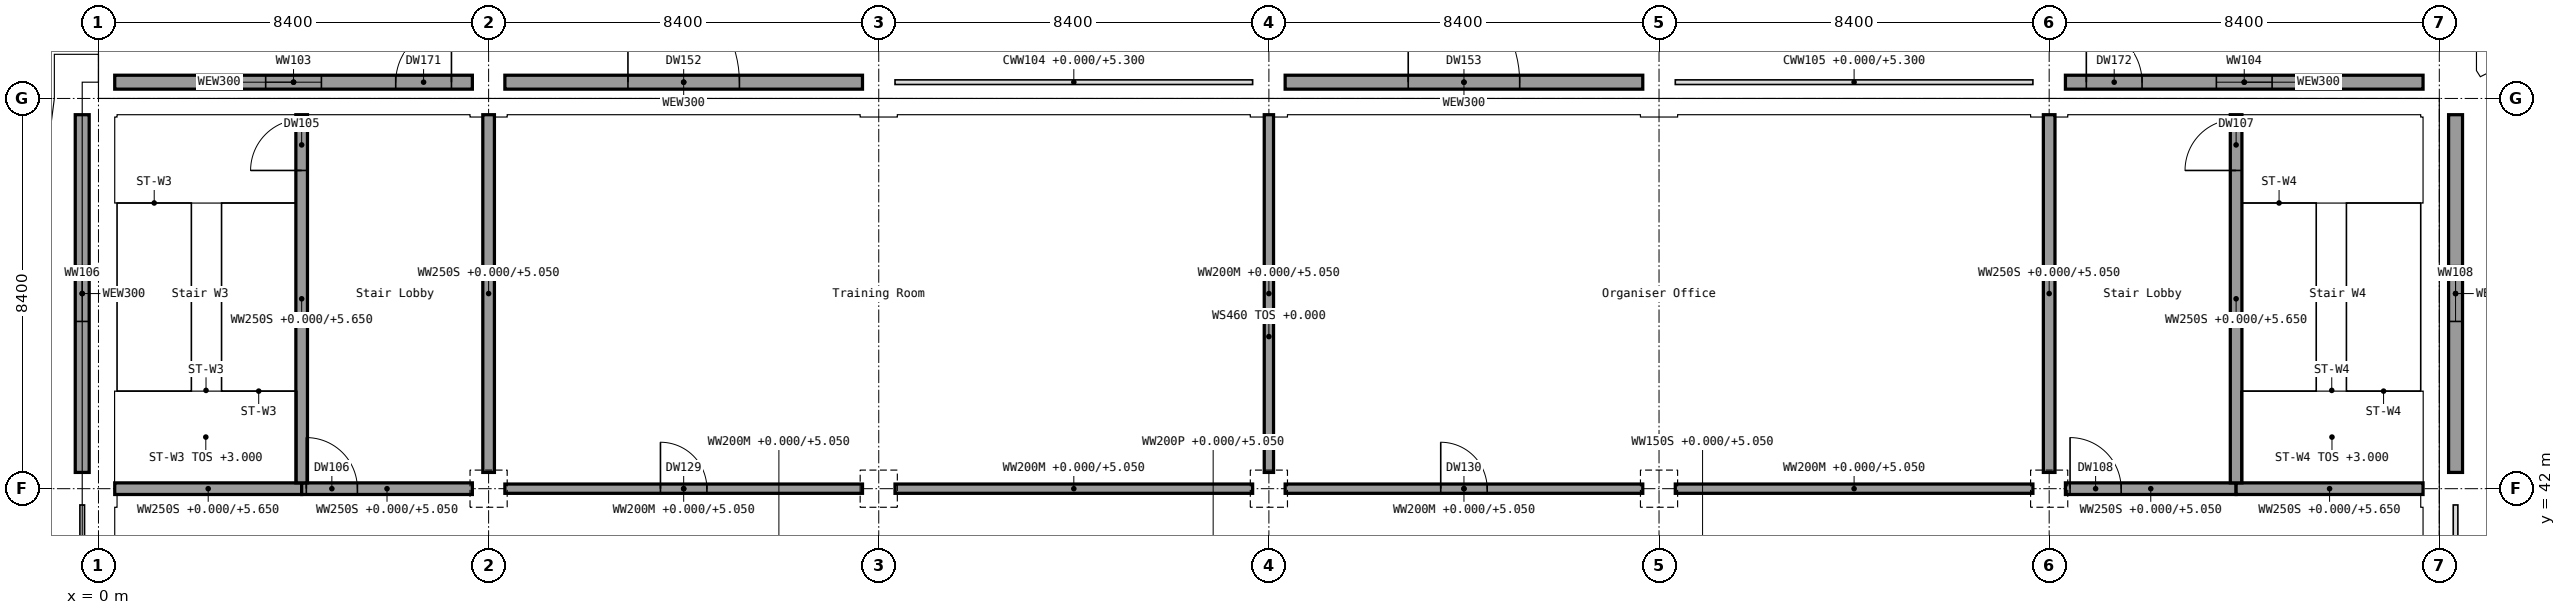
"""IFC4 building model, lengths in metres.
Left out: names, types, materials, properties, quantities, classifications, styles, units other than length and angle.
Written with IfcOpenShell. Run it as: python <this file> out.ifc"""

import sys

from ifc_helpers import new_model, si_unit, direction, frame, frame_2d, origin, origin_2d, place, context, subcontext, project, spatial, rectangle, extrude, element, fill, save


model = new_model("IFC4")
c1 = context("Model", 3, precision=1e-05, world=origin(), true_north=direction((0.0, 1.0)))
c2 = subcontext(c1, "Body", "Model", "MODEL_VIEW")
j1 = project(units=[si_unit("LENGTHUNIT", "METRE"), si_unit("PLANEANGLEUNIT", "RADIAN")], contexts=[c1])
p1 = place(None, origin())
s1 = spatial("IfcSite", under=j1, at=p1, CompositionType="ELEMENT")
p2 = place(p1, origin())
s2 = spatial("IfcBuilding", under=s1, at=p2, CompositionType="ELEMENT")
p3 = place(p2, origin())
s3 = spatial("IfcBuildingStorey", under=s2, at=p3, CompositionType="ELEMENT", Elevation=0.0)
for number, where, z_axis, x_axis in (
    (1, (0.0, 42.0, 0.0), (0.0, 0.0, 1.0), (1.0, 0.0, 0.0)),
    (2, (0.0, 50.4, 0.0), (0.0, 0.0, 1.0), (1.0, 0.0, 0.0)),
    (3, (8.4, 42.0, 0.0), (0.0, 0.0, 1.0), (1.0, 0.0, 0.0)),
    (4, (8.4, 50.4, 0.0), (0.0, 0.0, 1.0), (1.0, 0.0, 0.0)),
    (5, (16.8, 42.0, 0.0), (0.0, 0.0, 1.0), (1.0, 0.0, 0.0)),
    (6, (16.8, 50.4, 0.0), (0.0, 0.0, 1.0), (1.0, 0.0, 0.0)),
    (7, (25.2, 42.0, 0.0), (0.0, 0.0, 1.0), (1.0, 0.0, 0.0)),
    (8, (25.2, 50.4, 0.0), (0.0, 0.0, 1.0), (1.0, 0.0, 0.0)),
    (9, (33.6, 42.0, 0.0), (0.0, 0.0, 1.0), (1.0, 0.0, 0.0)),
    (10, (33.6, 50.4, 0.0), (0.0, 0.0, 1.0), (1.0, 0.0, 0.0)),
    (11, (42.0, 42.0, 0.0), (0.0, 0.0, 1.0), (1.0, 0.0, 0.0)),
    (12, (42.0, 50.4, 0.0), (0.0, 0.0, 1.0), (1.0, 0.0, 0.0)),
    (13, (50.4, 42.0, 0.0), (0.0, 0.0, 1.0), (1.0, 0.0, 0.0)),
    (14, (50.4, 50.4, 0.0), (0.0, 0.0, 1.0), (1.0, 0.0, 0.0)),
):
    element("IfcColumn", number, at=place(p3, frame(where, z_axis=z_axis, x_axis=x_axis)), inside=s3, PredefinedType="COLUMN", context=c2, shape_type="SweptSolid", body=[
        extrude(rectangle(XDim=0.7, YDim=0.7, at=origin_2d()), origin(), (0.0, 0.0, 1.0), 6.0),
    ])
p4 = place(p3, frame((0.35, 50.75, 0.0), z_axis=(0.0, 0.0, 1.0), x_axis=(1.0, 0.0, 0.0)))
e15 = element("IfcWall", 15, at=p4, inside=s3, PredefinedType="SOLIDWALL", context=c2, shape_type="SweptSolid", body=[
    extrude(rectangle(XDim=7.7, YDim=0.3, at=frame_2d((3.85, 0.0))), origin(), (0.0, 0.0, 1.0), 5.3),
])
p5 = place(p4, frame((3.25, 0.0, 1.0)))
e16 = element("IfcOpeningElement", 16, at=p5, cuts=e15, PredefinedType="OPENING", context=c2, shape_type="SweptSolid", body=[
    extrude(rectangle(XDim=1.2, YDim=1.5, at=frame_2d((0.6, 0.75))), frame((0.0, 0.15, 0.0), z_axis=(0.0, -1.0, 0.0), x_axis=(1.0, 0.0, 0.0)), (0.0, 0.0, 1.0), 0.3),
])
p6 = place(p4, frame((6.05, 0.0, 0.0)))
e17 = element("IfcOpeningElement", 17, at=p6, cuts=e15, PredefinedType="OPENING", context=c2, shape_type="SweptSolid", body=[
    extrude(rectangle(XDim=1.2, YDim=2.1, at=frame_2d((0.6, 1.05))), frame((0.0, 0.15, 0.0), z_axis=(0.0, -1.0, 0.0), x_axis=(1.0, 0.0, 0.0)), (0.0, 0.0, 1.0), 0.3),
])
p7 = place(p3, frame((8.75, 50.75, 0.0), z_axis=(0.0, 0.0, 1.0), x_axis=(1.0, 0.0, 0.0)))
e18 = element("IfcWall", 18, at=p7, inside=s3, PredefinedType="SOLIDWALL", context=c2, shape_type="SweptSolid", body=[
    extrude(rectangle(XDim=7.7, YDim=0.3, at=frame_2d((3.85, 0.0))), origin(), (0.0, 0.0, 1.0), 5.3),
])
p8 = place(p7, frame((2.65, 0.0, 0.0)))
e19 = element("IfcOpeningElement", 19, at=p8, cuts=e18, PredefinedType="OPENING", context=c2, shape_type="SweptSolid", body=[
    extrude(rectangle(XDim=2.4, YDim=2.4, at=frame_2d((1.2, 1.2))), frame((0.0, 0.15, 0.0), z_axis=(0.0, -1.0, 0.0), x_axis=(1.0, 0.0, 0.0)), (0.0, 0.0, 1.0), 0.3),
])
p9 = place(p3, frame((25.55, 50.75, 0.0), z_axis=(0.0, 0.0, 1.0), x_axis=(1.0, 0.0, 0.0)))
e20 = element("IfcWall", 20, at=p9, inside=s3, PredefinedType="SOLIDWALL", context=c2, shape_type="SweptSolid", body=[
    extrude(rectangle(XDim=7.7, YDim=0.3, at=frame_2d((3.85, 0.0))), origin(), (0.0, 0.0, 1.0), 5.3),
])
p10 = place(p9, frame((2.65, 0.0, 0.0)))
e21 = element("IfcOpeningElement", 21, at=p10, cuts=e20, PredefinedType="OPENING", context=c2, shape_type="SweptSolid", body=[
    extrude(rectangle(XDim=2.4, YDim=2.4, at=frame_2d((1.2, 1.2))), frame((0.0, 0.15, 0.0), z_axis=(0.0, -1.0, 0.0), x_axis=(1.0, 0.0, 0.0)), (0.0, 0.0, 1.0), 0.3),
])
p11 = place(p3, frame((42.35, 50.75, 0.0), z_axis=(0.0, 0.0, 1.0), x_axis=(1.0, 0.0, 0.0)))
e22 = element("IfcWall", 22, at=p11, inside=s3, PredefinedType="SOLIDWALL", context=c2, shape_type="SweptSolid", body=[
    extrude(rectangle(XDim=7.7, YDim=0.3, at=frame_2d((3.85, 0.0))), origin(), (0.0, 0.0, 1.0), 5.3),
])
p12 = place(p11, frame((3.25, 0.0, 1.0)))
e23 = element("IfcOpeningElement", 23, at=p12, cuts=e22, PredefinedType="OPENING", context=c2, shape_type="SweptSolid", body=[
    extrude(rectangle(XDim=1.2, YDim=1.5, at=frame_2d((0.6, 0.75))), frame((0.0, 0.15, 0.0), z_axis=(0.0, -1.0, 0.0), x_axis=(1.0, 0.0, 0.0)), (0.0, 0.0, 1.0), 0.3),
])
p13 = place(p11, frame((0.45, 0.0, 0.0)))
e24 = element("IfcOpeningElement", 24, at=p13, cuts=e22, PredefinedType="OPENING", context=c2, shape_type="SweptSolid", body=[
    extrude(rectangle(XDim=1.2, YDim=2.1, at=frame_2d((0.6, 1.05))), frame((0.0, 0.15, 0.0), z_axis=(0.0, -1.0, 0.0), x_axis=(1.0, 0.0, 0.0)), (0.0, 0.0, 1.0), 0.3),
])
p14 = place(p3, frame((-0.35, 42.35, 0.0), z_axis=(0.0, 0.0, 1.0), x_axis=(0.0, 1.0, 0.0)))
e25 = element("IfcWall", 25, at=p14, inside=s3, PredefinedType="SOLIDWALL", context=c2, shape_type="SweptSolid", body=[
    extrude(rectangle(XDim=7.7, YDim=0.3, at=frame_2d((3.85, 0.0))), origin(), (0.0, 0.0, 1.0), 5.3),
])
p15 = place(p14, frame((3.25, 0.0, 1.0)))
e26 = element("IfcOpeningElement", 26, at=p15, cuts=e25, PredefinedType="OPENING", context=c2, shape_type="SweptSolid", body=[
    extrude(rectangle(XDim=1.2, YDim=1.5, at=frame_2d((0.6, 0.75))), frame((0.0, 0.15, 0.0), z_axis=(0.0, -1.0, 0.0), x_axis=(1.0, 0.0, 0.0)), (0.0, 0.0, 1.0), 0.3),
])
p16 = place(p3, frame((50.75, 42.35, 0.0), z_axis=(0.0, 0.0, 1.0), x_axis=(0.0, 1.0, 0.0)))
e27 = element("IfcWall", 27, at=p16, inside=s3, PredefinedType="SOLIDWALL", context=c2, shape_type="SweptSolid", body=[
    extrude(rectangle(XDim=7.7, YDim=0.3, at=frame_2d((3.85, 0.0))), origin(), (0.0, 0.0, 1.0), 5.3),
])
p17 = place(p16, frame((3.25, 0.0, 1.0)))
e28 = element("IfcOpeningElement", 28, at=p17, cuts=e27, PredefinedType="OPENING", context=c2, shape_type="SweptSolid", body=[
    extrude(rectangle(XDim=1.2, YDim=1.5, at=frame_2d((0.6, 0.75))), frame((0.0, 0.15, 0.0), z_axis=(0.0, -1.0, 0.0), x_axis=(1.0, 0.0, 0.0)), (0.0, 0.0, 1.0), 0.3),
])
p18 = place(p3, frame((0.35, 42.0, 0.0), z_axis=(0.0, 0.0, 1.0), x_axis=(1.0, 0.0, 0.0)))
e29 = element("IfcWall", 29, at=p18, inside=s3, PredefinedType="SHEAR", context=c2, shape_type="SweptSolid", body=[
    extrude(rectangle(XDim=4.025, YDim=0.25, at=frame_2d((2.012, 0.0))), origin(), (0.0, 0.0, 1.0), 5.65),
])
p19 = place(p3, frame((4.375, 42.0, 0.0), z_axis=(0.0, 0.0, 1.0), x_axis=(1.0, 0.0, 0.0)))
e30 = element("IfcWall", 30, at=p19, inside=s3, PredefinedType="SHEAR", context=c2, shape_type="SweptSolid", body=[
    extrude(rectangle(XDim=3.675, YDim=0.25, at=frame_2d((1.837, 0.0))), origin(), (0.0, 0.0, 1.0), 5.05),
])
p20 = place(p19, frame((0.1, 0.0, 0.0)))
e31 = element("IfcOpeningElement", 31, at=p20, cuts=e30, PredefinedType="OPENING", context=c2, shape_type="SweptSolid", body=[
    extrude(rectangle(XDim=1.1, YDim=2.1, at=frame_2d((0.55, 1.05))), frame((0.0, 0.125, 0.0), z_axis=(0.0, -1.0, 0.0), x_axis=(1.0, 0.0, 0.0)), (0.0, 0.0, 1.0), 0.25),
])
p21 = place(p3, frame((8.75, 42.0, 0.0), z_axis=(0.0, 0.0, 1.0), x_axis=(1.0, 0.0, 0.0)))
e32 = element("IfcWall", 32, at=p21, inside=s3, PredefinedType="PARTITIONING", context=c2, shape_type="SweptSolid", body=[
    extrude(rectangle(XDim=7.7, YDim=0.2, at=frame_2d((3.85, 0.0))), origin(), (0.0, 0.0, 1.0), 5.05),
])
p22 = place(p21, frame((3.35, 0.0, 0.0)))
e33 = element("IfcOpeningElement", 33, at=p22, cuts=e32, PredefinedType="OPENING", context=c2, shape_type="SweptSolid", body=[
    extrude(rectangle(XDim=1.0, YDim=2.1, at=frame_2d((0.5, 1.05))), frame((0.0, 0.1, 0.0), z_axis=(0.0, -1.0, 0.0), x_axis=(1.0, 0.0, 0.0)), (0.0, 0.0, 1.0), 0.2),
])
p23 = place(p3, frame((17.15, 42.0, 0.0), z_axis=(0.0, 0.0, 1.0), x_axis=(1.0, 0.0, 0.0)))
e34 = element("IfcWall", 34, at=p23, inside=s3, PredefinedType="PARTITIONING", context=c2, shape_type="SweptSolid", body=[
    extrude(rectangle(XDim=7.7, YDim=0.2, at=frame_2d((3.85, 0.0))), origin(), (0.0, 0.0, 1.0), 5.05),
])
p24 = place(p3, frame((25.55, 42.0, 0.0), z_axis=(0.0, 0.0, 1.0), x_axis=(1.0, 0.0, 0.0)))
e35 = element("IfcWall", 35, at=p24, inside=s3, PredefinedType="PARTITIONING", context=c2, shape_type="SweptSolid", body=[
    extrude(rectangle(XDim=7.7, YDim=0.2, at=frame_2d((3.85, 0.0))), origin(), (0.0, 0.0, 1.0), 5.05),
])
p25 = place(p24, frame((3.35, 0.0, 0.0)))
e36 = element("IfcOpeningElement", 36, at=p25, cuts=e35, PredefinedType="OPENING", context=c2, shape_type="SweptSolid", body=[
    extrude(rectangle(XDim=1.0, YDim=2.1, at=frame_2d((0.5, 1.05))), frame((0.0, 0.1, 0.0), z_axis=(0.0, -1.0, 0.0), x_axis=(1.0, 0.0, 0.0)), (0.0, 0.0, 1.0), 0.2),
])
p26 = place(p3, frame((33.95, 42.0, 0.0), z_axis=(0.0, 0.0, 1.0), x_axis=(1.0, 0.0, 0.0)))
e37 = element("IfcWall", 37, at=p26, inside=s3, PredefinedType="PARTITIONING", context=c2, shape_type="SweptSolid", body=[
    extrude(rectangle(XDim=7.7, YDim=0.2, at=frame_2d((3.85, 0.0))), origin(), (0.0, 0.0, 1.0), 5.05),
])
p27 = place(p3, frame((42.35, 42.0, 0.0), z_axis=(0.0, 0.0, 1.0), x_axis=(1.0, 0.0, 0.0)))
e38 = element("IfcWall", 38, at=p27, inside=s3, PredefinedType="SHEAR", context=c2, shape_type="SweptSolid", body=[
    extrude(rectangle(XDim=3.675, YDim=0.25, at=frame_2d((1.837, 0.0))), origin(), (0.0, 0.0, 1.0), 5.05),
])
p28 = place(p27, frame((0.1, 0.0, 0.0)))
e39 = element("IfcOpeningElement", 39, at=p28, cuts=e38, PredefinedType="OPENING", context=c2, shape_type="SweptSolid", body=[
    extrude(rectangle(XDim=1.1, YDim=2.1, at=frame_2d((0.55, 1.05))), frame((0.0, 0.125, 0.0), z_axis=(0.0, -1.0, 0.0), x_axis=(1.0, 0.0, 0.0)), (0.0, 0.0, 1.0), 0.25),
])
p29 = place(p3, frame((46.025, 42.0, 0.0), z_axis=(0.0, 0.0, 1.0), x_axis=(1.0, 0.0, 0.0)))
e40 = element("IfcWall", 40, at=p29, inside=s3, PredefinedType="SHEAR", context=c2, shape_type="SweptSolid", body=[
    extrude(rectangle(XDim=4.025, YDim=0.25, at=frame_2d((2.013, 0.0))), origin(), (0.0, 0.0, 1.0), 5.65),
])
p30 = place(p3, frame((4.375, 42.125, 0.0), z_axis=(0.0, 0.0, 1.0), x_axis=(0.0, 1.0, 0.0)))
e41 = element("IfcWall", 41, at=p30, inside=s3, PredefinedType="SHEAR", context=c2, shape_type="SweptSolid", body=[
    extrude(rectangle(XDim=7.925, YDim=0.25, at=frame_2d((3.962, 0.0))), origin(), (0.0, 0.0, 1.0), 5.65),
])
p31 = place(p30, frame((6.725, 0.0, 0.0)))
e42 = element("IfcOpeningElement", 42, at=p31, cuts=e41, PredefinedType="OPENING", context=c2, shape_type="SweptSolid", body=[
    extrude(rectangle(XDim=1.1, YDim=2.1, at=frame_2d((0.55, 1.05))), frame((0.0, 0.125, 0.0), z_axis=(0.0, -1.0, 0.0), x_axis=(1.0, 0.0, 0.0)), (0.0, 0.0, 1.0), 0.25),
])
p32 = place(p3, frame((8.4, 42.35, 0.0), z_axis=(0.0, 0.0, 1.0), x_axis=(0.0, 1.0, 0.0)))
e43 = element("IfcWall", 43, at=p32, inside=s3, PredefinedType="SHEAR", context=c2, shape_type="SweptSolid", body=[
    extrude(rectangle(XDim=7.7, YDim=0.25, at=frame_2d((3.85, 0.0))), origin(), (0.0, 0.0, 1.0), 5.05),
])
p33 = place(p3, frame((25.2, 42.35, 0.0), z_axis=(0.0, 0.0, 1.0), x_axis=(0.0, 1.0, 0.0)))
e44 = element("IfcWall", 44, at=p33, inside=s3, PredefinedType="PARTITIONING", context=c2, shape_type="SweptSolid", body=[
    extrude(rectangle(XDim=7.7, YDim=0.2, at=frame_2d((3.85, 0.0))), origin(), (0.0, 0.0, 1.0), 5.05),
])
p34 = place(p3, frame((42.0, 42.35, 0.0), z_axis=(0.0, 0.0, 1.0), x_axis=(0.0, 1.0, 0.0)))
e45 = element("IfcWall", 45, at=p34, inside=s3, PredefinedType="SHEAR", context=c2, shape_type="SweptSolid", body=[
    extrude(rectangle(XDim=7.7, YDim=0.25, at=frame_2d((3.85, 0.0))), origin(), (0.0, 0.0, 1.0), 5.05),
])
p35 = place(p3, frame((46.025, 42.125, 0.0), z_axis=(0.0, 0.0, 1.0), x_axis=(0.0, 1.0, 0.0)))
e46 = element("IfcWall", 46, at=p35, inside=s3, PredefinedType="SHEAR", context=c2, shape_type="SweptSolid", body=[
    extrude(rectangle(XDim=7.925, YDim=0.25, at=frame_2d((3.962, 0.0))), origin(), (0.0, 0.0, 1.0), 5.65),
])
p36 = place(p35, frame((6.725, 0.0, 0.0)))
e47 = element("IfcOpeningElement", 47, at=p36, cuts=e46, PredefinedType="OPENING", context=c2, shape_type="SweptSolid", body=[
    extrude(rectangle(XDim=1.1, YDim=2.1, at=frame_2d((0.55, 1.05))), frame((0.0, 0.125, 0.0), z_axis=(0.0, -1.0, 0.0), x_axis=(1.0, 0.0, 0.0)), (0.0, 0.0, 1.0), 0.25),
])
p37 = place(p5, origin())
e48 = element("IfcWindow", 48, at=p37, inside=s3, PartitioningType="SINGLE_PANEL", PredefinedType="WINDOW", context=c2, shape_type="SweptSolid", body=[
    extrude(rectangle(XDim=1.2, YDim=1.5, at=frame_2d((0.6, 0.75))), frame((0.0, 0.03, 0.0), z_axis=(0.0, -1.0, 0.0), x_axis=(1.0, 0.0, 0.0)), (0.0, 0.0, 1.0), 0.06),
])
fill(e16, e48)
p38 = place(p6, origin())
e49 = element("IfcDoor", 49, at=p38, inside=s3, OperationType="SINGLE_SWING_RIGHT", PredefinedType="DOOR", context=c2, shape_type="SweptSolid", body=[
    extrude(rectangle(XDim=1.2, YDim=2.1, at=frame_2d((0.6, 1.05))), frame((0.0, 0.025, 0.0), z_axis=(0.0, -1.0, 0.0), x_axis=(1.0, 0.0, 0.0)), (0.0, 0.0, 1.0), 0.05),
])
fill(e17, e49)
p39 = place(p8, origin())
e50 = element("IfcDoor", 50, at=p39, inside=s3, OperationType="DOUBLE_DOOR_DOUBLE_SWING", PredefinedType="DOOR", context=c2, shape_type="SweptSolid", body=[
    extrude(rectangle(XDim=2.4, YDim=2.4, at=frame_2d((1.2, 1.2))), frame((0.0, 0.025, 0.0), z_axis=(0.0, -1.0, 0.0), x_axis=(1.0, 0.0, 0.0)), (0.0, 0.0, 1.0), 0.05),
])
fill(e19, e50)
p40 = place(p10, origin())
e51 = element("IfcDoor", 51, at=p40, inside=s3, OperationType="DOUBLE_DOOR_DOUBLE_SWING", PredefinedType="DOOR", context=c2, shape_type="SweptSolid", body=[
    extrude(rectangle(XDim=2.4, YDim=2.4, at=frame_2d((1.2, 1.2))), frame((0.0, 0.025, 0.0), z_axis=(0.0, -1.0, 0.0), x_axis=(1.0, 0.0, 0.0)), (0.0, 0.0, 1.0), 0.05),
])
fill(e21, e51)
p41 = place(p12, origin())
e52 = element("IfcWindow", 52, at=p41, inside=s3, PartitioningType="SINGLE_PANEL", PredefinedType="WINDOW", context=c2, shape_type="SweptSolid", body=[
    extrude(rectangle(XDim=1.2, YDim=1.5, at=frame_2d((0.6, 0.75))), frame((0.0, 0.03, 0.0), z_axis=(0.0, -1.0, 0.0), x_axis=(1.0, 0.0, 0.0)), (0.0, 0.0, 1.0), 0.06),
])
fill(e23, e52)
p42 = place(p13, origin())
e53 = element("IfcDoor", 53, at=p42, inside=s3, OperationType="SINGLE_SWING_LEFT", PredefinedType="DOOR", context=c2, shape_type="SweptSolid", body=[
    extrude(rectangle(XDim=1.2, YDim=2.1, at=frame_2d((0.6, 1.05))), frame((0.0, 0.025, 0.0), z_axis=(0.0, -1.0, 0.0), x_axis=(1.0, 0.0, 0.0)), (0.0, 0.0, 1.0), 0.05),
])
fill(e24, e53)
p43 = place(p15, origin())
e54 = element("IfcWindow", 54, at=p43, inside=s3, PartitioningType="SINGLE_PANEL", PredefinedType="WINDOW", context=c2, shape_type="SweptSolid", body=[
    extrude(rectangle(XDim=1.2, YDim=1.5, at=frame_2d((0.6, 0.75))), frame((0.0, 0.03, 0.0), z_axis=(0.0, -1.0, 0.0), x_axis=(1.0, 0.0, 0.0)), (0.0, 0.0, 1.0), 0.06),
])
fill(e26, e54)
p44 = place(p17, origin())
e55 = element("IfcWindow", 55, at=p44, inside=s3, PartitioningType="SINGLE_PANEL", PredefinedType="WINDOW", context=c2, shape_type="SweptSolid", body=[
    extrude(rectangle(XDim=1.2, YDim=1.5, at=frame_2d((0.6, 0.75))), frame((0.0, 0.03, 0.0), z_axis=(0.0, -1.0, 0.0), x_axis=(1.0, 0.0, 0.0)), (0.0, 0.0, 1.0), 0.06),
])
fill(e28, e55)
p45 = place(p31, origin())
e56 = element("IfcDoor", 56, at=p45, inside=s3, OperationType="SINGLE_SWING_RIGHT", PredefinedType="DOOR", context=c2, shape_type="SweptSolid", body=[
    extrude(rectangle(XDim=1.1, YDim=2.1, at=frame_2d((0.55, 1.05))), frame((0.0, 0.025, 0.0), z_axis=(0.0, -1.0, 0.0), x_axis=(1.0, 0.0, 0.0)), (0.0, 0.0, 1.0), 0.05),
])
fill(e42, e56)
p46 = place(p20, origin())
e57 = element("IfcDoor", 57, at=p46, inside=s3, OperationType="SINGLE_SWING_LEFT", PredefinedType="DOOR", context=c2, shape_type="SweptSolid", body=[
    extrude(rectangle(XDim=1.1, YDim=2.1, at=frame_2d((0.55, 1.05))), frame((0.0, 0.025, 0.0), z_axis=(0.0, -1.0, 0.0), x_axis=(1.0, 0.0, 0.0)), (0.0, 0.0, 1.0), 0.05),
])
fill(e31, e57)
p47 = place(p36, origin())
e58 = element("IfcDoor", 58, at=p47, inside=s3, OperationType="SINGLE_SWING_RIGHT", PredefinedType="DOOR", context=c2, shape_type="SweptSolid", body=[
    extrude(rectangle(XDim=1.1, YDim=2.1, at=frame_2d((0.55, 1.05))), frame((0.0, 0.025, 0.0), z_axis=(0.0, -1.0, 0.0), x_axis=(1.0, 0.0, 0.0)), (0.0, 0.0, 1.0), 0.05),
])
fill(e47, e58)
p48 = place(p28, origin())
e59 = element("IfcDoor", 59, at=p48, inside=s3, OperationType="SINGLE_SWING_LEFT", PredefinedType="DOOR", context=c2, shape_type="SweptSolid", body=[
    extrude(rectangle(XDim=1.1, YDim=2.1, at=frame_2d((0.55, 1.05))), frame((0.0, 0.025, 0.0), z_axis=(0.0, -1.0, 0.0), x_axis=(1.0, 0.0, 0.0)), (0.0, 0.0, 1.0), 0.05),
])
fill(e39, e59)
p49 = place(p22, origin())
e60 = element("IfcDoor", 60, at=p49, inside=s3, OperationType="SINGLE_SWING_LEFT", PredefinedType="DOOR", context=c2, shape_type="SweptSolid", body=[
    extrude(rectangle(XDim=1.0, YDim=2.1, at=frame_2d((0.5, 1.05))), frame((0.0, 0.025, 0.0), z_axis=(0.0, -1.0, 0.0), x_axis=(1.0, 0.0, 0.0)), (0.0, 0.0, 1.0), 0.05),
])
fill(e33, e60)
p50 = place(p25, origin())
e61 = element("IfcDoor", 61, at=p50, inside=s3, OperationType="SINGLE_SWING_LEFT", PredefinedType="DOOR", context=c2, shape_type="SweptSolid", body=[
    extrude(rectangle(XDim=1.0, YDim=2.1, at=frame_2d((0.5, 1.05))), frame((0.0, 0.025, 0.0), z_axis=(0.0, -1.0, 0.0), x_axis=(1.0, 0.0, 0.0)), (0.0, 0.0, 1.0), 0.05),
])
fill(e36, e61)
save(model, sys.argv[1])
